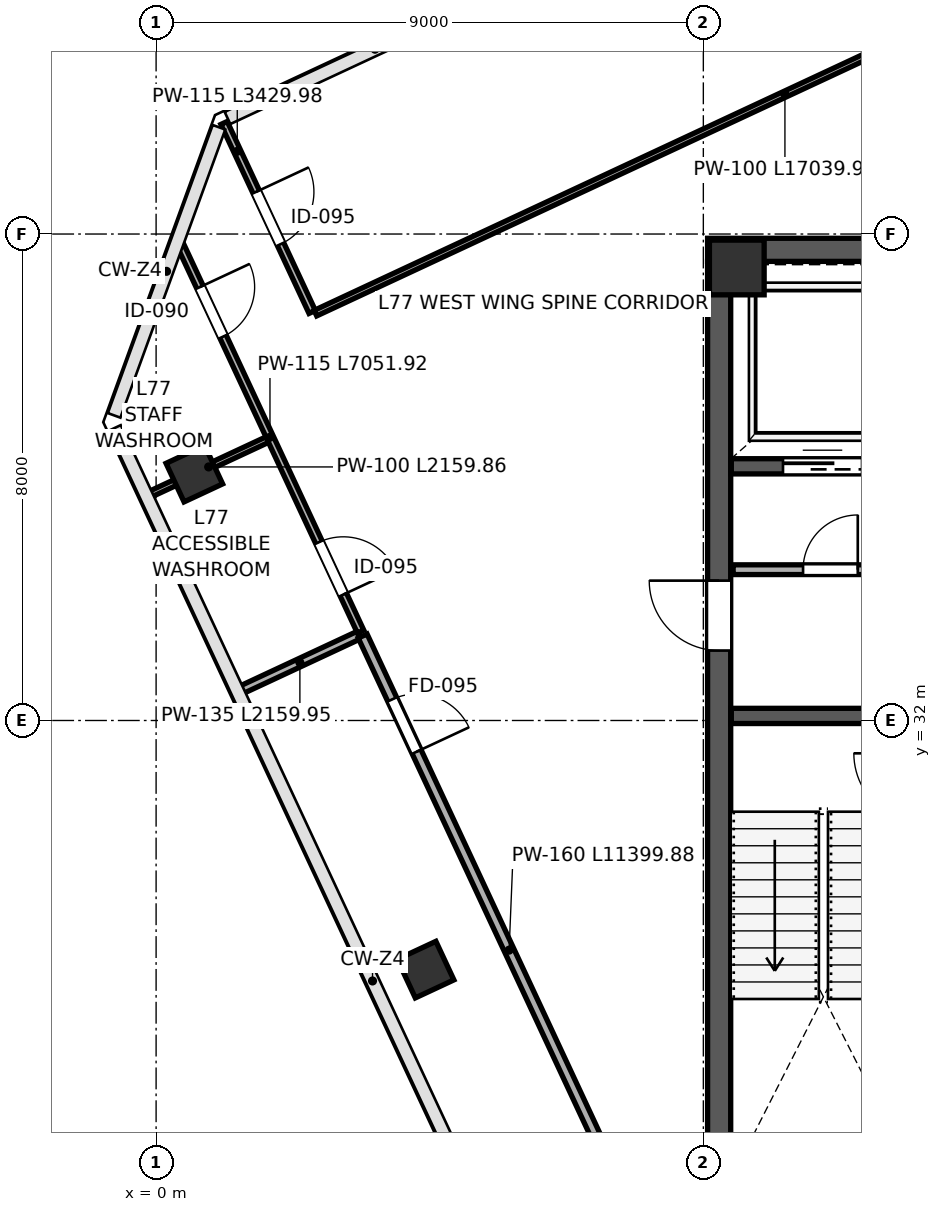
"""IFC4 building model, lengths in metres.
Left out: names, types, materials, properties, quantities, classifications, styles, units other than length and angle.
Written with IfcOpenShell. Run it as: python <this file> out.ifc"""

import sys

from ifc_helpers import new_model, si_unit, direction, frame, frame_2d, origin, origin_2d, place, context, subcontext, project, spatial, rectangle, extrude, source, transform, mapped, element, fill, save


model = new_model("IFC4")
c1 = context("Model", 3, precision=1e-05, world=origin(), true_north=direction((0.0, 1.0)))
c2 = subcontext(c1, "Body", "Model", "MODEL_VIEW")
j1 = project(units=[si_unit("LENGTHUNIT", "METRE"), si_unit("PLANEANGLEUNIT", "RADIAN")], contexts=[c1])
p1 = place(None, origin())
s1 = spatial("IfcSite", under=j1, at=p1, CompositionType="ELEMENT")
p2 = place(p1, origin())
s2 = spatial("IfcBuilding", under=s1, at=p2, CompositionType="ELEMENT")
p3 = place(p2, frame((0.0, 0.0, 340.8)))
s3 = spatial("IfcBuildingStorey", under=s2, at=p3, CompositionType="ELEMENT", Elevation=340.8)
m1 = source(origin(), c2, "Body", "SweptSolid", [
    extrude(rectangle(XDim=0.9, YDim=0.9, at=origin_2d()), origin(), (0.0, 0.0, 1.0), 4.198),
])
p4 = place(p3, frame((9.55, 39.45, 0.001), z_axis=(0.0, 0.0, 1.0), x_axis=(1.0, 0.0, 0.0)))
e1 = element("IfcColumn", 1, at=p4, inside=s3, PredefinedType="COLUMN", context=c2, shape_type="MappedRepresentation", body=[
    mapped(m1, transform((0.0, 0.0, 0.0), scale=1.0)),
])
m2 = source(origin(), c2, "Body", "SweptSolid", [
    extrude(rectangle(XDim=0.7, YDim=0.7, at=origin_2d()), origin(), (0.0, 0.0, 1.0), 4.198),
])
for number, where, z_axis, x_axis in (
    (2, (0.629, 36.06, 0.001), (0.0, 0.0, 1.0), (-0.423, 0.906, 0.0)),
    (3, (4.432, 27.903, 0.001), (0.0, 0.0, 1.0), (-0.423, 0.906, 0.0)),
):
    element("IfcColumn", number, at=place(p3, frame(where, z_axis=z_axis, x_axis=x_axis)), inside=s3, PredefinedType="COLUMN", context=c2, shape_type="MappedRepresentation", body=[
        mapped(m2, transform((0.0, 0.0, 0.0), scale=1.0)),
    ])
p5 = place(p3, frame((9.26, 24.45, 0.0), z_axis=(0.0, 0.0, 1.0), x_axis=(0.0, 1.0, 0.0)))
e4 = element("IfcWall", 4, at=p5, inside=s3, PredefinedType="SHEAR", context=c2, shape_type="SweptSolid", body=[
    extrude(rectangle(XDim=15.1, YDim=0.38, at=frame_2d((7.55, 0.0))), origin(), (0.0, 0.0, 1.0), 3.96),
])
p6 = place(p5, frame((8.7, 0.0, 0.0)))
e5 = element("IfcOpeningElement", 5, at=p6, cuts=e4, PredefinedType="OPENING", context=c2, shape_type="SweptSolid", body=[
    extrude(rectangle(XDim=1.15, YDim=2.2, at=frame_2d((0.575, 1.1))), frame((0.0, 0.2, 0.0), z_axis=(0.0, -1.0, 0.0), x_axis=(1.0, 0.0, 0.0)), (0.0, 0.0, 1.0), 0.4),
])
p7 = place(p3, frame((9.07, 39.74, 0.0), z_axis=(0.0, 0.0, 1.0), x_axis=(1.0, 0.0, 0.0)))
e6 = element("IfcWall", 6, at=p7, inside=s3, PredefinedType="SHEAR", context=c2, shape_type="SweptSolid", body=[
    extrude(rectangle(XDim=17.86, YDim=0.38, at=frame_2d((8.93, 0.0))), origin(), (0.0, 0.0, 1.0), 3.96),
])
p8 = place(p3, frame((9.46, 32.075, 0.0), z_axis=(0.0, 0.0, 1.0), x_axis=(1.0, 0.0, 0.0)))
e7 = element("IfcWall", 7, at=p8, inside=s3, PredefinedType="SHEAR", context=c2, shape_type="SweptSolid", body=[
    extrude(rectangle(XDim=3.29, YDim=0.25, at=frame_2d((1.645, 0.0))), origin(), (0.0, 0.0, 1.0), 3.96),
])
p9 = place(p3, frame((9.46, 36.18, 0.0), z_axis=(0.0, 0.0, 1.0), x_axis=(1.0, 0.0, 0.0)))
e8 = element("IfcWall", 8, at=p9, inside=s3, PredefinedType="SHEAR", context=c2, shape_type="SweptSolid", body=[
    extrude(rectangle(XDim=3.79, YDim=0.25, at=frame_2d((1.895, 0.0))), origin(), (0.0, 0.0, 1.0), 3.96),
])
p10 = place(p9, frame((2.62, 0.0, 0.0)))
e9 = element("IfcOpeningElement", 9, at=p10, cuts=e8, PredefinedType="OPENING", context=c2, shape_type="SweptSolid", body=[
    extrude(rectangle(XDim=0.85, YDim=2.1, at=frame_2d((0.425, 1.05))), frame((0.0, 0.135, 0.0), z_axis=(0.0, -1.0, 0.0), x_axis=(1.0, 0.0, 0.0)), (0.0, 0.0, 1.0), 0.27),
])
p11 = place(p9, frame((0.85, 0.0, 0.0)))
e10 = element("IfcOpeningElement", 10, at=p11, cuts=e8, PredefinedType="OPENING", context=c2, shape_type="SweptSolid", body=[
    extrude(rectangle(XDim=1.3, YDim=2.25, at=frame_2d((0.65, 1.125))), frame((0.0, 0.135, 0.0), z_axis=(0.0, -1.0, 0.0), x_axis=(1.0, 0.0, 0.0)), (0.0, 0.0, 1.0), 0.27),
])
p12 = place(p3, frame((9.49, 34.48, 0.0), z_axis=(0.0, 0.0, 1.0), x_axis=(1.0, 0.0, 0.0)))
e11 = element("IfcWall", 11, at=p12, inside=s3, PredefinedType="PARTITIONING", context=c2, shape_type="SweptSolid", body=[
    extrude(rectangle(XDim=3.7, YDim=0.16, at=frame_2d((1.85, 0.0))), origin(), (0.0, 0.0, 1.0), 3.96),
])
p13 = place(p12, frame((1.15, 0.0, 0.0)))
e12 = element("IfcOpeningElement", 12, at=p13, cuts=e11, PredefinedType="OPENING", context=c2, shape_type="SweptSolid", body=[
    extrude(rectangle(XDim=0.9, YDim=2.15, at=frame_2d((0.45, 1.075))), frame((0.0, 0.09, 0.0), z_axis=(0.0, -1.0, 0.0), x_axis=(1.0, 0.0, 0.0)), (0.0, 0.0, 1.0), 0.18),
])
p14 = place(p3, frame((-0.114, 35.713, 0.0), z_axis=(0.0, 0.0, 1.0), x_axis=(0.906301500739, 0.422631742487, 0.0)))
e13 = element("IfcWall", 13, at=p14, inside=s3, PredefinedType="PARTITIONING", context=c2, shape_type="SweptSolid", body=[
    extrude(rectangle(XDim=2.16, YDim=0.1, at=frame_2d((1.08, 0.0))), origin(), (0.0, 0.0, 1.0), 3.295),
])
p15 = place(p3, frame((1.386, 32.496, 0.0), z_axis=(0.0, 0.0, 1.0), x_axis=(0.906301500739, 0.422631742487, 0.0)))
e14 = element("IfcWall", 14, at=p15, inside=s3, PredefinedType="PARTITIONING", context=c2, shape_type="SweptSolid", body=[
    extrude(rectangle(XDim=2.16, YDim=0.135, at=frame_2d((1.08, 0.0))), origin(), (0.0, 0.0, 1.0), 3.295),
])
p16 = place(p3, frame((0.383, 39.853, 0.0), z_axis=(0.0, 0.0, 1.0), x_axis=(0.422618208415, -0.906307811903, 0.0)))
e15 = element("IfcWall", 15, at=p16, inside=s3, PredefinedType="PARTITIONING", context=c2, shape_type="SweptSolid", body=[
    extrude(rectangle(XDim=7.052, YDim=0.115, at=frame_2d((3.526, 0.0))), origin(), (0.0, 0.0, 1.0), 3.96),
])
p17 = place(p16, frame((0.8, 0.0, 0.0)))
e16 = element("IfcOpeningElement", 16, at=p17, cuts=e15, PredefinedType="OPENING", context=c2, shape_type="SweptSolid", body=[
    extrude(rectangle(XDim=0.9, YDim=2.15, at=frame_2d((0.45, 1.075))), frame((0.0, 0.067, 0.0), z_axis=(0.0, -1.0, 0.0), x_axis=(1.0, 0.0, 0.0)), (0.0, 0.0, 1.0), 0.135),
])
p18 = place(p16, frame((5.43, 0.0, 0.0)))
e17 = element("IfcOpeningElement", 17, at=p18, cuts=e15, PredefinedType="OPENING", context=c2, shape_type="SweptSolid", body=[
    extrude(rectangle(XDim=0.95, YDim=2.15, at=frame_2d((0.475, 1.075))), frame((0.0, 0.067, 0.0), z_axis=(0.0, -1.0, 0.0), x_axis=(1.0, 0.0, 0.0)), (0.0, 0.0, 1.0), 0.135),
])
p19 = place(p3, frame((3.397, 33.389, 0.0), z_axis=(0.0, 0.0, 1.0), x_axis=(0.422624000171, -0.90630511114, 0.0)))
e18 = element("IfcWall", 18, at=p19, inside=s3, PredefinedType="PARTITIONING", context=c2, shape_type="SweptSolid", body=[
    extrude(rectangle(XDim=11.4, YDim=0.16, at=frame_2d((5.7, 0.0))), origin(), (0.0, 0.0, 1.0), 3.96),
])
p20 = place(p19, frame((1.15, 0.0, 0.0)))
e19 = element("IfcOpeningElement", 19, at=p20, cuts=e18, PredefinedType="OPENING", context=c2, shape_type="SweptSolid", body=[
    extrude(rectangle(XDim=0.95, YDim=2.15, at=frame_2d((0.475, 1.075))), frame((0.0, 0.09, 0.0), z_axis=(0.0, -1.0, 0.0), x_axis=(1.0, 0.0, 0.0)), (0.0, 0.0, 1.0), 0.18),
])
p21 = place(p3, frame((1.117, 41.827, 0.0), z_axis=(0.0, 0.0, 1.0), x_axis=(0.422589296843, -0.906321293027, 0.0)))
e20 = element("IfcWall", 20, at=p21, inside=s3, PredefinedType="PARTITIONING", context=c2, shape_type="SweptSolid", body=[
    extrude(rectangle(XDim=3.43, YDim=0.115, at=frame_2d((1.715, 0.0))), origin(), (0.0, 0.0, 1.0), 3.96),
])
p22 = place(p21, frame((1.25, 0.0, 0.0)))
e21 = element("IfcOpeningElement", 21, at=p22, cuts=e20, PredefinedType="OPENING", context=c2, shape_type="SweptSolid", body=[
    extrude(rectangle(XDim=0.95, YDim=2.15, at=frame_2d((0.475, 1.075))), frame((0.0, 0.067, 0.0), z_axis=(0.0, -1.0, 0.0), x_axis=(1.0, 0.0, 0.0)), (0.0, 0.0, 1.0), 0.135),
])
p23 = place(p3, frame((2.62, 38.698, 0.0), z_axis=(0.0, 0.0, 1.0), x_axis=(0.90630352598, 0.422627399487, 0.0)))
e22 = element("IfcWall", 22, at=p23, inside=s3, PredefinedType="PARTITIONING", context=c2, shape_type="SweptSolid", body=[
    extrude(rectangle(XDim=17.04, YDim=0.1, at=frame_2d((8.52, 0.0))), origin(), (0.0, 0.0, 1.0), 3.96),
])
m3 = source(origin(), c2, "Body", "SweptSolid", [
    extrude(rectangle(XDim=1.15, YDim=2.2, at=frame_2d((0.575, 1.1))), frame((0.0, 0.025, 0.0), z_axis=(0.0, -1.0, 0.0), x_axis=(1.0, 0.0, 0.0)), (0.0, 0.0, 1.0), 0.05),
])
p24 = place(p6, origin())
e23 = element("IfcDoor", 23, at=p24, inside=s3, OperationType="SINGLE_SWING_RIGHT", PredefinedType="DOOR", context=c2, shape_type="MappedRepresentation", body=[
    mapped(m3, transform((0.0, 0.0, 0.0), scale=1.0)),
])
fill(e5, e23)
m4 = source(origin(), c2, "Body", "SweptSolid", [
    extrude(rectangle(XDim=1.3, YDim=2.25, at=frame_2d((0.65, 1.125))), frame((0.0, 0.025, 0.0), z_axis=(0.0, -1.0, 0.0), x_axis=(1.0, 0.0, 0.0)), (0.0, 0.0, 1.0), 0.05),
])
p25 = place(p11, origin())
e24 = element("IfcDoor", 24, at=p25, inside=s3, OperationType="SLIDING_TO_LEFT", PredefinedType="DOOR", context=c2, shape_type="MappedRepresentation", body=[
    mapped(m4, transform((0.0, 0.0, 0.0), scale=1.0)),
])
fill(e10, e24)
m5 = source(origin(), c2, "Body", "SweptSolid", [
    extrude(rectangle(XDim=0.9, YDim=2.15, at=frame_2d((0.45, 1.075))), frame((0.0, 0.025, 0.0), z_axis=(0.0, -1.0, 0.0), x_axis=(1.0, 0.0, 0.0)), (0.0, 0.0, 1.0), 0.05),
])
p26 = place(p13, origin())
e25 = element("IfcDoor", 25, at=p26, inside=s3, OperationType="SINGLE_SWING_RIGHT", PredefinedType="DOOR", context=c2, shape_type="MappedRepresentation", body=[
    mapped(m5, transform((0.0, 0.0, 0.0), scale=1.0)),
])
fill(e12, e25)
m6 = source(origin(), c2, "Body", "SweptSolid", [
    extrude(rectangle(XDim=0.9, YDim=2.15, at=frame_2d((0.45, 1.075))), frame((0.0, 0.025, 0.0), z_axis=(0.0, -1.0, 0.0), x_axis=(1.0, 0.0, 0.0)), (0.0, 0.0, 1.0), 0.05),
])
p27 = place(p17, origin())
e26 = element("IfcDoor", 26, at=p27, inside=s3, OperationType="SINGLE_SWING_LEFT", PredefinedType="DOOR", context=c2, shape_type="MappedRepresentation", body=[
    mapped(m6, transform((0.0, 0.0, 0.0), scale=1.0)),
])
fill(e16, e26)
m7 = source(origin(), c2, "Body", "SweptSolid", [
    extrude(rectangle(XDim=0.95, YDim=2.15, at=frame_2d((0.475, 1.075))), frame((0.0, 0.025, 0.0), z_axis=(0.0, -1.0, 0.0), x_axis=(1.0, 0.0, 0.0)), (0.0, 0.0, 1.0), 0.05),
])
p28 = place(p18, origin())
e27 = element("IfcDoor", 27, at=p28, inside=s3, OperationType="SINGLE_SWING_RIGHT", PredefinedType="DOOR", context=c2, shape_type="MappedRepresentation", body=[
    mapped(m7, transform((0.0, 0.0, 0.0), scale=1.0)),
])
fill(e17, e27)
m8 = source(origin(), c2, "Body", "SweptSolid", [
    extrude(rectangle(XDim=0.95, YDim=2.15, at=frame_2d((0.475, 1.075))), frame((0.0, 0.025, 0.0), z_axis=(0.0, -1.0, 0.0), x_axis=(1.0, 0.0, 0.0)), (0.0, 0.0, 1.0), 0.05),
])
p29 = place(p20, origin())
e28 = element("IfcDoor", 28, at=p29, inside=s3, OperationType="SINGLE_SWING_RIGHT", PredefinedType="DOOR", context=c2, shape_type="MappedRepresentation", body=[
    mapped(m8, transform((0.0, 0.0, 0.0), scale=1.0)),
])
fill(e19, e28)
p30 = place(p22, origin())
e29 = element("IfcDoor", 29, at=p30, inside=s3, OperationType="SINGLE_SWING_LEFT", PredefinedType="DOOR", context=c2, shape_type="MappedRepresentation", body=[
    mapped(m7, transform((0.0, 0.0, 0.0), scale=1.0)),
])
fill(e21, e29)
save(model, sys.argv[1])
